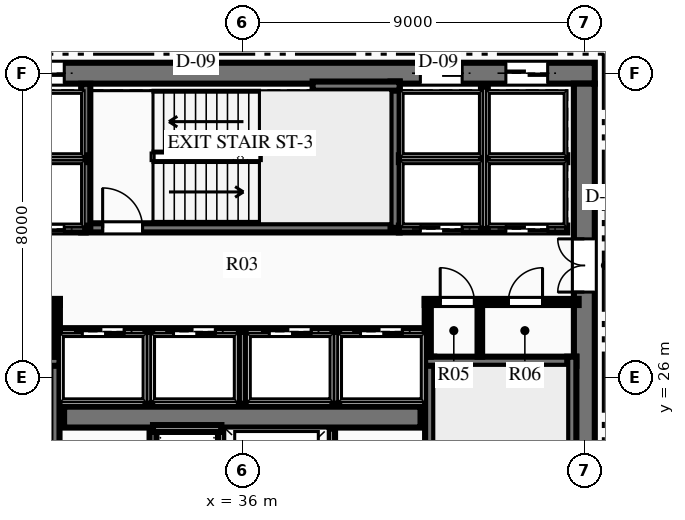
"""IFC4 building model, lengths in metres.
Left out: names, types, materials, properties, quantities, classifications, styles, units other than length and angle.
Written with IfcOpenShell. Run it as: python <this file> out.ifc"""

import sys

from ifc_helpers import new_model, si_unit, direction, frame, frame_2d, origin, place, context, subcontext, project, spatial, rectangle, extrude, element, fill, save


model = new_model("IFC4")
c1 = context("Model", 3, precision=1e-05, world=origin(), true_north=direction((0.0, 1.0)))
c2 = subcontext(c1, "Body", "Model", "MODEL_VIEW")
j1 = project(units=[si_unit("LENGTHUNIT", "METRE"), si_unit("PLANEANGLEUNIT", "RADIAN")], contexts=[c1])
p1 = place(None, origin())
s1 = spatial("IfcSite", under=j1, at=p1, CompositionType="ELEMENT")
p2 = place(p1, origin())
s2 = spatial("IfcBuilding", under=s1, at=p2, CompositionType="ELEMENT")
p3 = place(p2, frame((0.0, 0.0, 127.95)))
s3 = spatial("IfcBuildingStorey", under=s2, at=p3, CompositionType="ELEMENT", Elevation=127.95)
p4 = place(p3, frame((26.725, 34.0, 0.0), z_axis=(0.0, 0.0, 1.0), x_axis=(1.0, 0.0, 0.0)))
e1 = element("IfcWall", 1, at=p4, inside=s3, PredefinedType="SHEAR", context=c2, shape_type="SweptSolid", body=[
    extrude(rectangle(XDim=18.55, YDim=0.55, at=frame_2d((9.275, 0.0))), origin(), (0.0, 0.0, 1.0), 3.75),
])
p5 = place(p4, frame((1.24, 0.0, 0.0)))
e2 = element("IfcOpeningElement", 2, at=p5, cuts=e1, PredefinedType="OPENING", context=c2, shape_type="SweptSolid", body=[
    extrude(rectangle(XDim=1.1, YDim=2.15, at=frame_2d((0.55, 1.075))), frame((0.0, 0.285, 0.0), z_axis=(0.0, -1.0, 0.0), x_axis=(1.0, 0.0, 0.0)), (0.0, 0.0, 1.0), 0.57),
])
p6 = place(p4, frame((3.49, 0.0, 0.0)))
e3 = element("IfcOpeningElement", 3, at=p6, cuts=e1, PredefinedType="OPENING", context=c2, shape_type="SweptSolid", body=[
    extrude(rectangle(XDim=1.1, YDim=2.15, at=frame_2d((0.55, 1.075))), frame((0.0, 0.285, 0.0), z_axis=(0.0, -1.0, 0.0), x_axis=(1.0, 0.0, 0.0)), (0.0, 0.0, 1.0), 0.57),
])
p7 = place(p4, frame((13.96, 0.0, 0.0)))
e4 = element("IfcOpeningElement", 4, at=p7, cuts=e1, PredefinedType="OPENING", context=c2, shape_type="SweptSolid", body=[
    extrude(rectangle(XDim=1.1, YDim=2.15, at=frame_2d((0.55, 1.075))), frame((0.0, 0.285, 0.0), z_axis=(0.0, -1.0, 0.0), x_axis=(1.0, 0.0, 0.0)), (0.0, 0.0, 1.0), 0.57),
])
p8 = place(p4, frame((16.21, 0.0, 0.0)))
e5 = element("IfcOpeningElement", 5, at=p8, cuts=e1, PredefinedType="OPENING", context=c2, shape_type="SweptSolid", body=[
    extrude(rectangle(XDim=1.1, YDim=2.15, at=frame_2d((0.55, 1.075))), frame((0.0, 0.285, 0.0), z_axis=(0.0, -1.0, 0.0), x_axis=(1.0, 0.0, 0.0)), (0.0, 0.0, 1.0), 0.57),
])
p9 = place(p3, frame((45.0, 18.275, 0.0), z_axis=(0.0, 0.0, 1.0), x_axis=(0.0, 1.0, 0.0)))
e6 = element("IfcWall", 6, at=p9, inside=s3, PredefinedType="SHEAR", context=c2, shape_type="SweptSolid", body=[
    extrude(rectangle(XDim=15.45, YDim=0.55, at=frame_2d((7.725, 0.0))), origin(), (0.0, 0.0, 1.0), 3.75),
])
p10 = place(p9, frame((9.965, 0.0, 0.0)))
e7 = element("IfcOpeningElement", 7, at=p10, cuts=e6, PredefinedType="OPENING", context=c2, shape_type="SweptSolid", body=[
    extrude(rectangle(XDim=1.4, YDim=2.2, at=frame_2d((0.7, 1.1))), frame((0.0, 0.285, 0.0), z_axis=(0.0, -1.0, 0.0), x_axis=(1.0, 0.0, 0.0)), (0.0, 0.0, 1.0), 0.57),
])
p11 = place(p3, frame((31.31, 24.95, 0.0), z_axis=(0.0, 0.0, 1.0), x_axis=(1.0, 0.0, 0.0)))
e8 = element("IfcWall", 8, at=p11, inside=s3, PredefinedType="SHEAR", context=c2, shape_type="SweptSolid", body=[
    extrude(rectangle(XDim=9.38, YDim=0.55, at=frame_2d((4.69, 0.0))), origin(), (0.0, 0.0, 1.0), 3.75),
])
p12 = place(p3, frame((31.07, 18.28, 0.0), z_axis=(0.0, 0.0, 1.0), x_axis=(0.0, 1.0, 0.0)))
e9 = element("IfcWall", 9, at=p12, inside=s3, PredefinedType="SHEAR", context=c2, shape_type="SweptSolid", body=[
    extrude(rectangle(XDim=8.26, YDim=0.24, at=frame_2d((4.13, 0.0))), origin(), (0.0, 0.0, 1.0), 3.75),
])
p13 = place(p12, frame((0.365, 0.0, 0.0)))
e10 = element("IfcOpeningElement", 10, at=p13, cuts=e9, PredefinedType="OPENING", context=c2, shape_type="SweptSolid", body=[
    extrude(rectangle(XDim=1.05, YDim=2.15, at=frame_2d((0.525, 1.075))), frame((0.0, 0.13, 0.0), z_axis=(0.0, -1.0, 0.0), x_axis=(1.0, 0.0, 0.0)), (0.0, 0.0, 1.0), 0.26),
])
p14 = place(p3, frame((27.21, 26.42, 0.0), z_axis=(0.0, 0.0, 1.0), x_axis=(1.0, 0.0, 0.0)))
e11 = element("IfcWall", 11, at=p14, inside=s3, PredefinedType="SHEAR", context=c2, shape_type="SweptSolid", body=[
    extrude(rectangle(XDim=3.98, YDim=0.24, at=frame_2d((1.99, 0.0))), origin(), (0.0, 0.0, 1.0), 3.75),
])
p15 = place(p3, frame((40.93, 18.28, 0.0), z_axis=(0.0, 0.0, 1.0), x_axis=(0.0, 1.0, 0.0)))
e12 = element("IfcWall", 12, at=p15, inside=s3, PredefinedType="SHEAR", context=c2, shape_type="SweptSolid", body=[
    extrude(rectangle(XDim=8.26, YDim=0.24, at=frame_2d((4.13, 0.0))), origin(), (0.0, 0.0, 1.0), 3.75),
])
p16 = place(p15, frame((0.365, 0.0, 0.0)))
e13 = element("IfcOpeningElement", 13, at=p16, cuts=e12, PredefinedType="OPENING", context=c2, shape_type="SweptSolid", body=[
    extrude(rectangle(XDim=1.05, YDim=2.15, at=frame_2d((0.525, 1.075))), frame((0.0, 0.13, 0.0), z_axis=(0.0, -1.0, 0.0), x_axis=(1.0, 0.0, 0.0)), (0.0, 0.0, 1.0), 0.26),
])
p17 = place(p3, frame((40.81, 26.42, 0.0), z_axis=(0.0, 0.0, 1.0), x_axis=(1.0, 0.0, 0.0)))
e14 = element("IfcWall", 14, at=p17, inside=s3, PredefinedType="SHEAR", context=c2, shape_type="SweptSolid", body=[
    extrude(rectangle(XDim=3.98, YDim=0.24, at=frame_2d((1.99, 0.0))), origin(), (0.0, 0.0, 1.0), 3.75),
])
p18 = place(p3, frame((44.67, 18.28, 0.0), z_axis=(0.0, 0.0, 1.0), x_axis=(0.0, 1.0, 0.0)))
e15 = element("IfcWall", 15, at=p18, inside=s3, PredefinedType="SHEAR", context=c2, shape_type="SweptSolid", body=[
    extrude(rectangle(XDim=8.26, YDim=0.24, at=frame_2d((4.13, 0.0))), origin(), (0.0, 0.0, 1.0), 3.75),
])
p19 = place(p3, frame((31.76, 29.93, 0.0), z_axis=(0.0, 0.0, 1.0), x_axis=(1.0, 0.0, 0.0)))
e16 = element("IfcWall", 16, at=p19, inside=s3, PredefinedType="SHEAR", context=c2, shape_type="SweptSolid", body=[
    extrude(rectangle(XDim=8.38, YDim=0.24, at=frame_2d((4.19, 0.0))), origin(), (0.0, 0.0, 1.0), 3.75),
])
p20 = place(p19, frame((0.565, 0.0, 0.0)))
e17 = element("IfcOpeningElement", 17, at=p20, cuts=e16, PredefinedType="OPENING", context=c2, shape_type="SweptSolid", body=[
    extrude(rectangle(XDim=1.05, YDim=2.15, at=frame_2d((0.525, 1.075))), frame((0.0, 0.13, 0.0), z_axis=(0.0, -1.0, 0.0), x_axis=(1.0, 0.0, 0.0)), (0.0, 0.0, 1.0), 0.26),
])
p21 = place(p3, frame((31.88, 29.93, 0.0), z_axis=(0.0, 0.0, 1.0), x_axis=(0.0, 1.0, 0.0)))
e18 = element("IfcWall", 18, at=p21, inside=s3, PredefinedType="SHEAR", context=c2, shape_type="SweptSolid", body=[
    extrude(rectangle(XDim=3.79, YDim=0.24, at=frame_2d((1.895, 0.0))), origin(), (0.0, 0.0, 1.0), 3.75),
])
p22 = place(p3, frame((40.02, 29.93, 0.0), z_axis=(0.0, 0.0, 1.0), x_axis=(0.0, 1.0, 0.0)))
e19 = element("IfcWall", 19, at=p22, inside=s3, PredefinedType="SHEAR", context=c2, shape_type="SweptSolid", body=[
    extrude(rectangle(XDim=3.85, YDim=0.24, at=frame_2d((1.925, 0.0))), origin(), (0.0, 0.0, 1.0), 3.75),
])
p23 = place(p3, frame((37.85, 33.66, 0.0), z_axis=(0.0, 0.0, 1.0), x_axis=(1.0, 0.0, 0.0)))
e20 = element("IfcWall", 20, at=p23, inside=s3, PredefinedType="SHEAR", context=c2, shape_type="SweptSolid", body=[
    extrude(rectangle(XDim=2.29, YDim=0.24, at=frame_2d((1.145, 0.0))), origin(), (0.0, 0.0, 1.0), 3.75),
])
for number, where, z_axis, x_axis in (
    (21, (33.65, 22.05, 0.0), (0.0, 0.0, 1.0), (0.0, 1.0, 0.0)),
    (22, (35.45, 22.05, 0.0), (0.0, 0.0, 1.0), (0.0, 1.0, 0.0)),
):
    element("IfcWall", number, at=place(p3, frame(where, z_axis=z_axis, x_axis=x_axis)), inside=s3, PredefinedType="PARTITIONING", context=c2, shape_type="SweptSolid", body=[
        extrude(rectangle(XDim=2.6, YDim=0.18, at=frame_2d((1.3, 0.0))), origin(), (0.0, 0.0, 1.0), 3.4),
    ])
p24 = place(p3, frame((33.65, 24.65, 0.0), z_axis=(0.0, 0.0, 1.0), x_axis=(1.0, 0.0, 0.0)))
e23 = element("IfcWall", 23, at=p24, inside=s3, PredefinedType="PARTITIONING", context=c2, shape_type="SweptSolid", body=[
    extrude(rectangle(XDim=1.8, YDim=0.18, at=frame_2d((0.9, 0.0))), origin(), (0.0, 0.0, 1.0), 3.4),
])
p25 = place(p3, frame((38.35, 22.05, 0.0), z_axis=(0.0, 0.0, 1.0), x_axis=(0.0, 1.0, 0.0)))
e24 = element("IfcWall", 24, at=p25, inside=s3, PredefinedType="PARTITIONING", context=c2, shape_type="SweptSolid", body=[
    extrude(rectangle(XDim=2.6, YDim=0.18, at=frame_2d((1.3, 0.0))), origin(), (0.0, 0.0, 1.0), 3.4),
])
p26 = place(p3, frame((27.15, 27.98, 0.0), z_axis=(0.0, 0.0, 1.0), x_axis=(1.0, 0.0, 0.0)))
e25 = element("IfcWall", 25, at=p26, inside=s3, PredefinedType="PARTITIONING", context=c2, shape_type="SweptSolid", body=[
    extrude(rectangle(XDim=4.05, YDim=0.16, at=frame_2d((2.025, 0.0))), origin(), (0.0, 0.0, 1.0), 3.4),
])
p27 = place(p26, frame((1.625, 0.0, 0.0)))
e26 = element("IfcOpeningElement", 26, at=p27, cuts=e25, PredefinedType="OPENING", context=c2, shape_type="SweptSolid", body=[
    extrude(rectangle(XDim=0.95, YDim=2.15, at=frame_2d((0.475, 1.075))), frame((0.0, 0.09, 0.0), z_axis=(0.0, -1.0, 0.0), x_axis=(1.0, 0.0, 0.0)), (0.0, 0.0, 1.0), 0.18),
])
p28 = place(p3, frame((31.12, 26.54, 0.0), z_axis=(0.0, 0.0, 1.0), x_axis=(0.0, 1.0, 0.0)))
e27 = element("IfcWall", 27, at=p28, inside=s3, PredefinedType="PARTITIONING", context=c2, shape_type="SweptSolid", body=[
    extrude(rectangle(XDim=1.51, YDim=0.16, at=frame_2d((0.755, 0.0))), origin(), (0.0, 0.0, 1.0), 3.4),
])
p29 = place(p3, frame((40.8, 27.98, 0.0), z_axis=(0.0, 0.0, 1.0), x_axis=(1.0, 0.0, 0.0)))
e28 = element("IfcWall", 28, at=p29, inside=s3, PredefinedType="PARTITIONING", context=c2, shape_type="SweptSolid", body=[
    extrude(rectangle(XDim=4.05, YDim=0.16, at=frame_2d((2.025, 0.0))), origin(), (0.0, 0.0, 1.0), 3.4),
])
p30 = place(p29, frame((0.407, 0.0, 0.0)))
e29 = element("IfcOpeningElement", 29, at=p30, cuts=e28, PredefinedType="OPENING", context=c2, shape_type="SweptSolid", body=[
    extrude(rectangle(XDim=0.9, YDim=2.15, at=frame_2d((0.45, 1.075))), frame((0.0, 0.09, 0.0), z_axis=(0.0, -1.0, 0.0), x_axis=(1.0, 0.0, 0.0)), (0.0, 0.0, 1.0), 0.18),
])
p31 = place(p29, frame((2.2, 0.0, 0.0)))
e30 = element("IfcOpeningElement", 30, at=p31, cuts=e28, PredefinedType="OPENING", context=c2, shape_type="SweptSolid", body=[
    extrude(rectangle(XDim=0.9, YDim=2.15, at=frame_2d((0.45, 1.075))), frame((0.0, 0.09, 0.0), z_axis=(0.0, -1.0, 0.0), x_axis=(1.0, 0.0, 0.0)), (0.0, 0.0, 1.0), 0.18),
])
p32 = place(p3, frame((40.88, 26.54, 0.0), z_axis=(0.0, 0.0, 1.0), x_axis=(0.0, 1.0, 0.0)))
e31 = element("IfcWall", 31, at=p32, inside=s3, PredefinedType="PARTITIONING", context=c2, shape_type="SweptSolid", body=[
    extrude(rectangle(XDim=1.51, YDim=0.16, at=frame_2d((0.755, 0.0))), origin(), (0.0, 0.0, 1.0), 3.4),
])
p33 = place(p3, frame((42.25, 26.54, 0.0), z_axis=(0.0, 0.0, 1.0), x_axis=(0.0, 1.0, 0.0)))
e32 = element("IfcWall", 32, at=p33, inside=s3, PredefinedType="PARTITIONING", context=c2, shape_type="SweptSolid", body=[
    extrude(rectangle(XDim=1.44, YDim=0.12, at=frame_2d((0.72, 0.0))), origin(), (0.0, 0.0, 1.0), 3.4),
])
p34 = place(p3, frame((27.45, 29.9, 0.0), z_axis=(0.0, 0.0, 1.0), x_axis=(1.0, 0.0, 0.0)))
e33 = element("IfcWall", 33, at=p34, inside=s3, PredefinedType="PARTITIONING", context=c2, shape_type="SweptSolid", body=[
    extrude(rectangle(XDim=4.43, YDim=0.18, at=frame_2d((2.215, 0.0))), origin(), (0.0, 0.0, 1.0), 3.4),
])
p35 = place(p34, frame((0.515, 0.0, 0.0)))
e34 = element("IfcOpeningElement", 34, at=p35, cuts=e33, PredefinedType="OPENING", context=c2, shape_type="SweptSolid", body=[
    extrude(rectangle(XDim=1.1, YDim=2.15, at=frame_2d((0.55, 1.075))), frame((0.0, 0.1, 0.0), z_axis=(0.0, -1.0, 0.0), x_axis=(1.0, 0.0, 0.0)), (0.0, 0.0, 1.0), 0.2),
])
p36 = place(p34, frame((2.765, 0.0, 0.0)))
e35 = element("IfcOpeningElement", 35, at=p36, cuts=e33, PredefinedType="OPENING", context=c2, shape_type="SweptSolid", body=[
    extrude(rectangle(XDim=1.1, YDim=2.15, at=frame_2d((0.55, 1.075))), frame((0.0, 0.1, 0.0), z_axis=(0.0, -1.0, 0.0), x_axis=(1.0, 0.0, 0.0)), (0.0, 0.0, 1.0), 0.2),
])
p37 = place(p3, frame((27.45, 31.75, 0.0), z_axis=(0.0, 0.0, 1.0), x_axis=(1.0, 0.0, 0.0)))
e36 = element("IfcWall", 36, at=p37, inside=s3, PredefinedType="PARTITIONING", context=c2, shape_type="SweptSolid", body=[
    extrude(rectangle(XDim=4.43, YDim=0.18, at=frame_2d((2.215, 0.0))), origin(), (0.0, 0.0, 1.0), 3.4),
])
p38 = place(p3, frame((40.12, 29.9, 0.0), z_axis=(0.0, 0.0, 1.0), x_axis=(1.0, 0.0, 0.0)))
e37 = element("IfcWall", 37, at=p38, inside=s3, PredefinedType="PARTITIONING", context=c2, shape_type="SweptSolid", body=[
    extrude(rectangle(XDim=4.43, YDim=0.18, at=frame_2d((2.215, 0.0))), origin(), (0.0, 0.0, 1.0), 3.4),
])
p39 = place(p38, frame((0.565, 0.0, 0.0)))
e38 = element("IfcOpeningElement", 38, at=p39, cuts=e37, PredefinedType="OPENING", context=c2, shape_type="SweptSolid", body=[
    extrude(rectangle(XDim=1.1, YDim=2.15, at=frame_2d((0.55, 1.075))), frame((0.0, 0.1, 0.0), z_axis=(0.0, -1.0, 0.0), x_axis=(1.0, 0.0, 0.0)), (0.0, 0.0, 1.0), 0.2),
])
p40 = place(p38, frame((2.815, 0.0, 0.0)))
e39 = element("IfcOpeningElement", 39, at=p40, cuts=e37, PredefinedType="OPENING", context=c2, shape_type="SweptSolid", body=[
    extrude(rectangle(XDim=1.1, YDim=2.15, at=frame_2d((0.55, 1.075))), frame((0.0, 0.1, 0.0), z_axis=(0.0, -1.0, 0.0), x_axis=(1.0, 0.0, 0.0)), (0.0, 0.0, 1.0), 0.2),
])
p41 = place(p3, frame((40.12, 31.75, 0.0), z_axis=(0.0, 0.0, 1.0), x_axis=(1.0, 0.0, 0.0)))
e40 = element("IfcWall", 40, at=p41, inside=s3, PredefinedType="PARTITIONING", context=c2, shape_type="SweptSolid", body=[
    extrude(rectangle(XDim=4.43, YDim=0.18, at=frame_2d((2.215, 0.0))), origin(), (0.0, 0.0, 1.0), 3.4),
])
p42 = place(p3, frame((42.37, 29.9, 0.0), z_axis=(0.0, 0.0, 1.0), x_axis=(0.0, 1.0, 0.0)))
e41 = element("IfcWall", 41, at=p42, inside=s3, PredefinedType="PARTITIONING", context=c2, shape_type="SweptSolid", body=[
    extrude(rectangle(XDim=3.75, YDim=0.18, at=frame_2d((1.875, 0.0))), origin(), (0.0, 0.0, 1.0), 3.4),
])
p43 = place(p3, frame((31.2, 27.2, 0.0), z_axis=(0.0, 0.0, 1.0), x_axis=(1.0, 0.0, 0.0)))
e42 = element("IfcWall", 42, at=p43, inside=s3, PredefinedType="PARTITIONING", context=c2, shape_type="SweptSolid", body=[
    extrude(rectangle(XDim=9.6, YDim=0.18, at=frame_2d((4.8, 0.0))), origin(), (0.0, 0.0, 1.0), 3.4),
])
p44 = place(p43, frame((0.59, 0.0, 0.0)))
e43 = element("IfcOpeningElement", 43, at=p44, cuts=e42, PredefinedType="OPENING", context=c2, shape_type="SweptSolid", body=[
    extrude(rectangle(XDim=1.1, YDim=2.15, at=frame_2d((0.55, 1.075))), frame((0.0, 0.1, 0.0), z_axis=(0.0, -1.0, 0.0), x_axis=(1.0, 0.0, 0.0)), (0.0, 0.0, 1.0), 0.2),
])
p45 = place(p43, frame((2.99, 0.0, 0.0)))
e44 = element("IfcOpeningElement", 44, at=p45, cuts=e42, PredefinedType="OPENING", context=c2, shape_type="SweptSolid", body=[
    extrude(rectangle(XDim=1.1, YDim=2.15, at=frame_2d((0.55, 1.075))), frame((0.0, 0.1, 0.0), z_axis=(0.0, -1.0, 0.0), x_axis=(1.0, 0.0, 0.0)), (0.0, 0.0, 1.0), 0.2),
])
p46 = place(p43, frame((5.51, 0.0, 0.0)))
e45 = element("IfcOpeningElement", 45, at=p46, cuts=e42, PredefinedType="OPENING", context=c2, shape_type="SweptSolid", body=[
    extrude(rectangle(XDim=1.1, YDim=2.15, at=frame_2d((0.55, 1.075))), frame((0.0, 0.1, 0.0), z_axis=(0.0, -1.0, 0.0), x_axis=(1.0, 0.0, 0.0)), (0.0, 0.0, 1.0), 0.2),
])
p47 = place(p43, frame((7.91, 0.0, 0.0)))
e46 = element("IfcOpeningElement", 46, at=p47, cuts=e42, PredefinedType="OPENING", context=c2, shape_type="SweptSolid", body=[
    extrude(rectangle(XDim=1.1, YDim=2.15, at=frame_2d((0.55, 1.075))), frame((0.0, 0.1, 0.0), z_axis=(0.0, -1.0, 0.0), x_axis=(1.0, 0.0, 0.0)), (0.0, 0.0, 1.0), 0.2),
])
for number, where, z_axis, x_axis in (
    (47, (33.54, 25.3, 0.0), (0.0, 0.0, 1.0), (0.0, 1.0, 0.0)),
    (48, (36.0, 25.3, 0.0), (0.0, 0.0, 1.0), (0.0, 1.0, 0.0)),
    (49, (38.46, 25.3, 0.0), (0.0, 0.0, 1.0), (0.0, 1.0, 0.0)),
):
    element("IfcWall", number, at=place(p3, frame(where, z_axis=z_axis, x_axis=x_axis)), inside=s3, PredefinedType="PARTITIONING", context=c2, shape_type="SweptSolid", body=[
        extrude(rectangle(XDim=1.9, YDim=0.18, at=frame_2d((0.95, 0.0))), origin(), (0.0, 0.0, 1.0), 3.4),
    ])
p48 = place(p30, origin())
e50 = element("IfcDoor", 50, at=p48, inside=s3, OperationType="SINGLE_SWING_LEFT", PredefinedType="DOOR", context=c2, shape_type="SweptSolid", body=[
    extrude(rectangle(XDim=0.9, YDim=2.15, at=frame_2d((0.45, 1.075))), frame((0.0, 0.025, 0.0), z_axis=(0.0, -1.0, 0.0), x_axis=(1.0, 0.0, 0.0)), (0.0, 0.0, 1.0), 0.05),
])
fill(e29, e50)
p49 = place(p31, origin())
e51 = element("IfcDoor", 51, at=p49, inside=s3, OperationType="SINGLE_SWING_RIGHT", PredefinedType="DOOR", context=c2, shape_type="SweptSolid", body=[
    extrude(rectangle(XDim=0.9, YDim=2.15, at=frame_2d((0.45, 1.075))), frame((0.0, 0.025, 0.0), z_axis=(0.0, -1.0, 0.0), x_axis=(1.0, 0.0, 0.0)), (0.0, 0.0, 1.0), 0.05),
])
fill(e30, e51)
p50 = place(p20, origin())
e52 = element("IfcDoor", 52, at=p50, inside=s3, OperationType="SINGLE_SWING_LEFT", PredefinedType="DOOR", context=c2, shape_type="SweptSolid", body=[
    extrude(rectangle(XDim=1.05, YDim=2.15, at=frame_2d((0.525, 1.075))), frame((0.0, 0.025, 0.0), z_axis=(0.0, -1.0, 0.0), x_axis=(1.0, 0.0, 0.0)), (0.0, 0.0, 1.0), 0.05),
])
fill(e17, e52)
p51 = place(p10, origin())
e53 = element("IfcDoor", 53, at=p51, inside=s3, OperationType="DOUBLE_DOOR_SINGLE_SWING", PredefinedType="DOOR", context=c2, shape_type="SweptSolid", body=[
    extrude(rectangle(XDim=1.4, YDim=2.2, at=frame_2d((0.7, 1.1))), frame((0.0, 0.025, 0.0), z_axis=(0.0, -1.0, 0.0), x_axis=(1.0, 0.0, 0.0)), (0.0, 0.0, 1.0), 0.05),
])
fill(e7, e53)
p52 = place(p36, origin())
e54 = element("IfcDoor", 54, at=p52, inside=s3, OperationType="SLIDING_TO_LEFT", PredefinedType="DOOR", context=c2, shape_type="SweptSolid", body=[
    extrude(rectangle(XDim=1.1, YDim=2.15, at=frame_2d((0.55, 1.075))), frame((0.0, 0.025, 0.0), z_axis=(0.0, -1.0, 0.0), x_axis=(1.0, 0.0, 0.0)), (0.0, 0.0, 1.0), 0.05),
])
fill(e35, e54)
p53 = place(p6, origin())
e55 = element("IfcDoor", 55, at=p53, inside=s3, OperationType="SLIDING_TO_LEFT", PredefinedType="DOOR", context=c2, shape_type="SweptSolid", body=[
    extrude(rectangle(XDim=1.1, YDim=2.15, at=frame_2d((0.55, 1.075))), frame((0.0, 0.025, 0.0), z_axis=(0.0, -1.0, 0.0), x_axis=(1.0, 0.0, 0.0)), (0.0, 0.0, 1.0), 0.05),
])
fill(e3, e55)
p54 = place(p39, origin())
e56 = element("IfcDoor", 56, at=p54, inside=s3, OperationType="SLIDING_TO_LEFT", PredefinedType="DOOR", context=c2, shape_type="SweptSolid", body=[
    extrude(rectangle(XDim=1.1, YDim=2.15, at=frame_2d((0.55, 1.075))), frame((0.0, 0.025, 0.0), z_axis=(0.0, -1.0, 0.0), x_axis=(1.0, 0.0, 0.0)), (0.0, 0.0, 1.0), 0.05),
])
fill(e38, e56)
p55 = place(p40, origin())
e57 = element("IfcDoor", 57, at=p55, inside=s3, OperationType="SLIDING_TO_LEFT", PredefinedType="DOOR", context=c2, shape_type="SweptSolid", body=[
    extrude(rectangle(XDim=1.1, YDim=2.15, at=frame_2d((0.55, 1.075))), frame((0.0, 0.025, 0.0), z_axis=(0.0, -1.0, 0.0), x_axis=(1.0, 0.0, 0.0)), (0.0, 0.0, 1.0), 0.05),
])
fill(e39, e57)
p56 = place(p7, origin())
e58 = element("IfcDoor", 58, at=p56, inside=s3, OperationType="SLIDING_TO_LEFT", PredefinedType="DOOR", context=c2, shape_type="SweptSolid", body=[
    extrude(rectangle(XDim=1.1, YDim=2.15, at=frame_2d((0.55, 1.075))), frame((0.0, 0.025, 0.0), z_axis=(0.0, -1.0, 0.0), x_axis=(1.0, 0.0, 0.0)), (0.0, 0.0, 1.0), 0.05),
])
fill(e4, e58)
p57 = place(p8, origin())
e59 = element("IfcDoor", 59, at=p57, inside=s3, OperationType="SLIDING_TO_LEFT", PredefinedType="DOOR", context=c2, shape_type="SweptSolid", body=[
    extrude(rectangle(XDim=1.1, YDim=2.15, at=frame_2d((0.55, 1.075))), frame((0.0, 0.025, 0.0), z_axis=(0.0, -1.0, 0.0), x_axis=(1.0, 0.0, 0.0)), (0.0, 0.0, 1.0), 0.05),
])
fill(e5, e59)
p58 = place(p44, origin())
e60 = element("IfcDoor", 60, at=p58, inside=s3, OperationType="SLIDING_TO_LEFT", PredefinedType="DOOR", context=c2, shape_type="SweptSolid", body=[
    extrude(rectangle(XDim=1.1, YDim=2.15, at=frame_2d((0.55, 1.075))), frame((0.0, 0.025, 0.0), z_axis=(0.0, -1.0, 0.0), x_axis=(1.0, 0.0, 0.0)), (0.0, 0.0, 1.0), 0.05),
])
fill(e43, e60)
p59 = place(p45, origin())
e61 = element("IfcDoor", 61, at=p59, inside=s3, OperationType="SLIDING_TO_LEFT", PredefinedType="DOOR", context=c2, shape_type="SweptSolid", body=[
    extrude(rectangle(XDim=1.1, YDim=2.15, at=frame_2d((0.55, 1.075))), frame((0.0, 0.025, 0.0), z_axis=(0.0, -1.0, 0.0), x_axis=(1.0, 0.0, 0.0)), (0.0, 0.0, 1.0), 0.05),
])
fill(e44, e61)
p60 = place(p46, origin())
e62 = element("IfcDoor", 62, at=p60, inside=s3, OperationType="SLIDING_TO_LEFT", PredefinedType="DOOR", context=c2, shape_type="SweptSolid", body=[
    extrude(rectangle(XDim=1.1, YDim=2.15, at=frame_2d((0.55, 1.075))), frame((0.0, 0.025, 0.0), z_axis=(0.0, -1.0, 0.0), x_axis=(1.0, 0.0, 0.0)), (0.0, 0.0, 1.0), 0.05),
])
fill(e45, e62)
p61 = place(p47, origin())
e63 = element("IfcDoor", 63, at=p61, inside=s3, OperationType="SLIDING_TO_LEFT", PredefinedType="DOOR", context=c2, shape_type="SweptSolid", body=[
    extrude(rectangle(XDim=1.1, YDim=2.15, at=frame_2d((0.55, 1.075))), frame((0.0, 0.025, 0.0), z_axis=(0.0, -1.0, 0.0), x_axis=(1.0, 0.0, 0.0)), (0.0, 0.0, 1.0), 0.05),
])
fill(e46, e63)
save(model, sys.argv[1])
